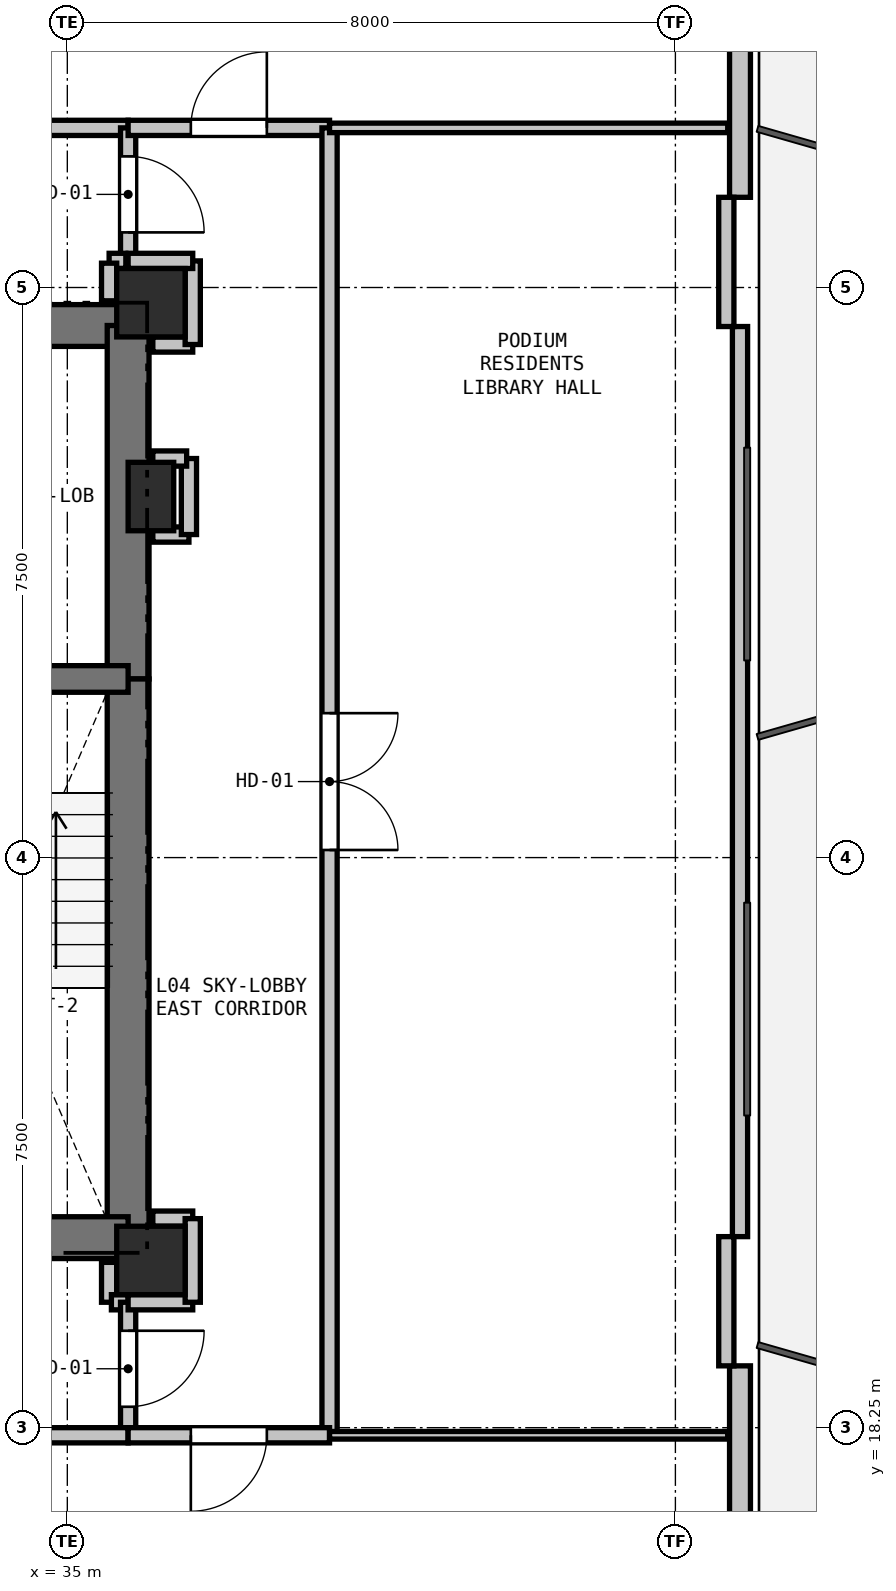
"""IFC4 building model, lengths in metres.
Left out: names, types, materials, properties, quantities, classifications, styles, units other than length and angle.
Written with IfcOpenShell. Run it as: python <this file> out.ifc"""

import sys

from ifc_helpers import new_model, si_unit, direction, frame, frame_2d, origin, origin_2d, place, context, subcontext, project, spatial, rectangle, extrude, element, fill, save


model = new_model("IFC4")
c1 = context("Model", 3, precision=1e-05, world=origin(), true_north=direction((0.0, 1.0)))
c2 = subcontext(c1, "Body", "Model", "MODEL_VIEW")
j1 = project(units=[si_unit("LENGTHUNIT", "METRE"), si_unit("PLANEANGLEUNIT", "RADIAN")], contexts=[c1])
p1 = place(None, origin())
s1 = spatial("IfcSite", under=j1, at=p1, CompositionType="ELEMENT")
p2 = place(p1, origin())
s2 = spatial("IfcBuilding", under=s1, at=p2, CompositionType="ELEMENT")
p3 = place(p2, frame((0.0, 0.0, 19.2)))
s3 = spatial("IfcBuildingStorey", under=s2, at=p3, CompositionType="ELEMENT", Elevation=19.2)
for number, where, z_axis, x_axis in (
    (1, (36.1, 33.05, 0.0), (0.0, 0.0, 1.0), (1.0, 0.0, 0.0)),
    (2, (36.1, 20.45, 0.0), (0.0, 0.0, 1.0), (1.0, 0.0, 0.0)),
):
    element("IfcColumn", number, at=place(p3, frame(where, z_axis=z_axis, x_axis=x_axis)), inside=s3, PredefinedType="COLUMN", context=c2, shape_type="SweptSolid", body=[
        extrude(rectangle(XDim=0.9, YDim=0.9, at=origin_2d()), origin(), (0.0, 0.0, 1.0), 3.3),
    ])
p4 = place(p3, frame((36.1, 30.5, 0.0), z_axis=(0.0, 0.0, 1.0), x_axis=(1.0, 0.0, 0.0)))
e3 = element("IfcColumn", 3, at=p4, inside=s3, PredefinedType="PILASTER", context=c2, shape_type="SweptSolid", body=[
    extrude(rectangle(XDim=0.6, YDim=0.9, at=origin_2d()), origin(), (0.0, 0.0, 1.0), 3.3),
])
p5 = place(p3, frame((43.85, 47.11, 0.0), z_axis=(0.0, 0.0, 1.0), x_axis=(0.0, -1.0, 0.0)))
e4 = element("IfcWall", 4, at=p5, inside=s3, PredefinedType="SOLIDWALL", context=c2, shape_type="SweptSolid", body=[
    extrude(rectangle(XDim=12.673, YDim=0.275, at=frame_2d((6.336, 0.0))), origin(), (0.0, 0.0, 1.0), 2.66),
])
p6 = place(p5, frame((8.136, 0.0, 0.0)))
e5 = element("IfcOpeningElement", 5, at=p6, cuts=e4, PredefinedType="OPENING", context=c2, shape_type="SweptSolid", body=[
    extrude(rectangle(XDim=1.0, YDim=2.1, at=frame_2d((0.5, 1.05))), frame((0.0, 0.147, 0.0), z_axis=(0.0, -1.0, 0.0), x_axis=(1.0, 0.0, 0.0)), (0.0, 0.0, 1.0), 0.295),
])
p7 = place(p3, frame((43.85, 32.737, 0.0), z_axis=(0.0, 0.0, 1.0), x_axis=(0.0, -1.0, 0.0)))
e6 = element("IfcWall", 6, at=p7, inside=s3, PredefinedType="PARAPET", context=c2, shape_type="SweptSolid", body=[
    extrude(rectangle(XDim=11.973, YDim=0.2, at=frame_2d((5.987, 0.0))), origin(), (0.0, 0.0, 1.0), 0.2),
])
p8 = place(p3, frame((43.85, 19.063, 0.0), z_axis=(0.0, 0.0, 1.0), x_axis=(0.0, -1.0, 0.0)))
e7 = element("IfcWall", 7, at=p8, inside=s3, PredefinedType="SOLIDWALL", context=c2, shape_type="SweptSolid", body=[
    extrude(rectangle(XDim=12.673, YDim=0.275, at=frame_2d((6.336, 0.0))), origin(), (0.0, 0.0, 1.0), 2.66),
])
p9 = place(p8, frame((2.876, 0.0, 0.9)))
e8 = element("IfcOpeningElement", 8, at=p9, cuts=e7, PredefinedType="OPENING", context=c2, shape_type="SweptSolid", body=[
    extrude(rectangle(XDim=2.4, YDim=1.6, at=frame_2d((1.2, 0.8))), frame((0.0, 0.147, 0.0), z_axis=(0.0, -1.0, 0.0), x_axis=(1.0, 0.0, 0.0)), (0.0, 0.0, 1.0), 0.295),
])
for number, where, z_axis, x_axis in (
    (9, (43.67, 34.437, 0.0), (0.0, 0.0, 1.0), (0.0, -1.0, 0.0)),
    (10, (43.67, 20.763, 0.0), (0.0, 0.0, 1.0), (0.0, -1.0, 0.0)),
):
    element("IfcWall", number, at=place(p3, frame(where, z_axis=z_axis, x_axis=x_axis)), inside=s3, PredefinedType="PARAPET", context=c2, shape_type="SweptSolid", body=[
        extrude(rectangle(XDim=1.7, YDim=0.2, at=frame_2d((0.85, 0.0))), origin(), (0.0, 0.0, 1.0), 2.66),
    ])
p10 = place(p3, frame((32.35, 32.75, 0.0), z_axis=(0.0, 0.0, 1.0), x_axis=(1.0, 0.0, 0.0)))
e11 = element("IfcWall", 11, at=p10, inside=s3, PredefinedType="SHEAR", context=c2, shape_type="SweptSolid", body=[
    extrude(rectangle(XDim=3.45, YDim=0.55, at=frame_2d((1.725, 0.0))), origin(), (0.0, 0.0, 1.0), 3.04),
])
p11 = place(p10, frame((0.65, 0.0, 0.0)))
e12 = element("IfcOpeningElement", 12, at=p11, cuts=e11, PredefinedType="OPENING", context=c2, shape_type="SweptSolid", body=[
    extrude(rectangle(XDim=1.15, YDim=2.15, at=frame_2d((0.575, 1.075))), frame((0.0, 0.285, 0.0), z_axis=(0.0, -1.0, 0.0), x_axis=(1.0, 0.0, 0.0)), (0.0, 0.0, 1.0), 0.57),
])
p12 = place(p3, frame((35.8, 32.75, 0.0), z_axis=(0.0, 0.0, 1.0), x_axis=(0.0, -1.0, 0.0)))
e13 = element("IfcWall", 13, at=p12, inside=s3, PredefinedType="SHEAR", context=c2, shape_type="SweptSolid", body=[
    extrude(rectangle(XDim=4.65, YDim=0.55, at=frame_2d((2.325, 0.0))), origin(), (0.0, 0.0, 1.0), 3.04),
])
p13 = place(p3, frame((35.8, 28.1, 0.0), z_axis=(0.0, 0.0, 1.0), x_axis=(0.0, -1.0, 0.0)))
e14 = element("IfcWall", 14, at=p13, inside=s3, PredefinedType="SHEAR", context=c2, shape_type="SweptSolid", body=[
    extrude(rectangle(XDim=7.35, YDim=0.55, at=frame_2d((3.675, 0.0))), origin(), (0.0, 0.0, 1.0), 3.04),
])
p14 = place(p3, frame((35.8, 20.75, 0.0), z_axis=(0.0, 0.0, 1.0), x_axis=(-1.0, 0.0, 0.0)))
e15 = element("IfcWall", 15, at=p14, inside=s3, PredefinedType="SHEAR", context=c2, shape_type="SweptSolid", body=[
    extrude(rectangle(XDim=3.45, YDim=0.55, at=frame_2d((1.725, 0.0))), origin(), (0.0, 0.0, 1.0), 3.04),
])
p15 = place(p3, frame((32.35, 28.1, 0.0), z_axis=(0.0, 0.0, 1.0), x_axis=(1.0, 0.0, 0.0)))
e16 = element("IfcWall", 16, at=p15, inside=s3, PredefinedType="SHEAR", context=c2, shape_type="SweptSolid", body=[
    extrude(rectangle(XDim=3.45, YDim=0.35, at=frame_2d((1.725, 0.0))), origin(), (0.0, 0.0, 1.0), 3.04),
])
p16 = place(p15, frame((1.15, 0.0, 0.0)))
e17 = element("IfcOpeningElement", 17, at=p16, cuts=e16, PredefinedType="OPENING", context=c2, shape_type="SweptSolid", body=[
    extrude(rectangle(XDim=1.15, YDim=2.15, at=frame_2d((0.575, 1.075))), frame((0.0, 0.185, 0.0), z_axis=(0.0, -1.0, 0.0), x_axis=(1.0, 0.0, 0.0)), (0.0, 0.0, 1.0), 0.37),
])
p17 = place(p3, frame((35.55, 20.425, 0.0), z_axis=(0.0, 0.0, 1.0), x_axis=(0.0, -1.0, 0.0)))
e18 = element("IfcWall", 18, at=p17, inside=s3, PredefinedType="PARTITIONING", context=c2, shape_type="SweptSolid", body=[
    extrude(rectangle(XDim=0.525, YDim=0.2, at=frame_2d((0.263, 0.0))), origin(), (0.0, 0.0, 1.0), 2.488),
])
p18 = place(p3, frame((35.58, 19.9, 0.0), z_axis=(0.0, 0.0, 1.0), x_axis=(1.0, 0.0, 0.0)))
e19 = element("IfcWall", 19, at=p18, inside=s3, PredefinedType="PARTITIONING", context=c2, shape_type="SweptSolid", body=[
    extrude(rectangle(XDim=0.22, YDim=0.2, at=frame_2d((0.11, 0.0))), origin(), (0.0, 0.0, 1.0), 3.04),
])
p19 = place(p3, frame((35.8, 19.9, 0.0), z_axis=(0.0, 0.0, 1.0), x_axis=(0.0, -1.0, 0.0)))
e20 = element("IfcWall", 20, at=p19, inside=s3, PredefinedType="PARTITIONING", context=c2, shape_type="SweptSolid", body=[
    extrude(rectangle(XDim=1.75, YDim=0.2, at=frame_2d((0.875, 0.0))), origin(), (0.0, 0.0, 1.0), 3.04),
])
p20 = place(p19, frame((0.375, 0.0, 0.0)))
e21 = element("IfcOpeningElement", 21, at=p20, cuts=e20, PredefinedType="OPENING", context=c2, shape_type="SweptSolid", body=[
    extrude(rectangle(XDim=1.0, YDim=2.15, at=frame_2d((0.5, 1.075))), frame((0.0, 0.11, 0.0), z_axis=(0.0, -1.0, 0.0), x_axis=(1.0, 0.0, 0.0)), (0.0, 0.0, 1.0), 0.22),
])
p21 = place(p3, frame((35.8, 18.15, 0.0), z_axis=(0.0, 0.0, 1.0), x_axis=(-1.0, 0.0, 0.0)))
e22 = element("IfcWall", 22, at=p21, inside=s3, PredefinedType="PARTITIONING", context=c2, shape_type="SweptSolid", body=[
    extrude(rectangle(XDim=8.3, YDim=0.2, at=frame_2d((4.15, 0.0))), origin(), (0.0, 0.0, 1.0), 3.04),
])
p22 = place(p21, frame((3.25, 0.0, 0.0)))
e23 = element("IfcOpeningElement", 23, at=p22, cuts=e22, PredefinedType="OPENING", context=c2, shape_type="SweptSolid", body=[
    extrude(rectangle(XDim=1.8, YDim=2.2, at=frame_2d((0.9, 1.1))), frame((0.0, 0.11, 0.0), z_axis=(0.0, -1.0, 0.0), x_axis=(1.0, 0.0, 0.0)), (0.0, 0.0, 1.0), 0.22),
])
p23 = place(p3, frame((28.0, 35.35, 0.0), z_axis=(0.0, 0.0, 1.0), x_axis=(1.0, 0.0, 0.0)))
e24 = element("IfcWall", 24, at=p23, inside=s3, PredefinedType="PARTITIONING", context=c2, shape_type="SweptSolid", body=[
    extrude(rectangle(XDim=7.8, YDim=0.2, at=frame_2d((3.9, 0.0))), origin(), (0.0, 0.0, 1.0), 3.04),
])
p24 = place(p23, frame((3.4, 0.0, 0.0)))
e25 = element("IfcOpeningElement", 25, at=p24, cuts=e24, PredefinedType="OPENING", context=c2, shape_type="SweptSolid", body=[
    extrude(rectangle(XDim=1.0, YDim=2.15, at=frame_2d((0.5, 1.075))), frame((0.0, 0.11, 0.0), z_axis=(0.0, -1.0, 0.0), x_axis=(1.0, 0.0, 0.0)), (0.0, 0.0, 1.0), 0.22),
])
p25 = place(p3, frame((35.8, 35.35, 0.0), z_axis=(0.0, 0.0, 1.0), x_axis=(0.0, -1.0, 0.0)))
e26 = element("IfcWall", 26, at=p25, inside=s3, PredefinedType="PARTITIONING", context=c2, shape_type="SweptSolid", body=[
    extrude(rectangle(XDim=1.75, YDim=0.2, at=frame_2d((0.875, 0.0))), origin(), (0.0, 0.0, 1.0), 3.04),
])
p26 = place(p25, frame((0.375, 0.0, 0.0)))
e27 = element("IfcOpeningElement", 27, at=p26, cuts=e26, PredefinedType="OPENING", context=c2, shape_type="SweptSolid", body=[
    extrude(rectangle(XDim=1.0, YDim=2.15, at=frame_2d((0.5, 1.075))), frame((0.0, 0.11, 0.0), z_axis=(0.0, -1.0, 0.0), x_axis=(1.0, 0.0, 0.0)), (0.0, 0.0, 1.0), 0.22),
])
p27 = place(p3, frame((35.77, 33.6, 0.0), z_axis=(0.0, 0.0, 1.0), x_axis=(-1.0, 0.0, 0.0)))
e28 = element("IfcWall", 28, at=p27, inside=s3, PredefinedType="PARTITIONING", context=c2, shape_type="SweptSolid", body=[
    extrude(rectangle(XDim=0.22, YDim=0.2, at=frame_2d((0.11, 0.0))), origin(), (0.0, 0.0, 1.0), 3.04),
])
p28 = place(p3, frame((35.55, 33.57, 0.0), z_axis=(0.0, 0.0, 1.0), x_axis=(0.0, -1.0, 0.0)))
e29 = element("IfcWall", 29, at=p28, inside=s3, PredefinedType="PARTITIONING", context=c2, shape_type="SweptSolid", body=[
    extrude(rectangle(XDim=0.495, YDim=0.2, at=frame_2d((0.248, 0.0))), origin(), (0.0, 0.0, 1.0), 2.488),
])
p29 = place(p3, frame((36.65, 21.0, 0.0), z_axis=(0.0, 0.0, 1.0), x_axis=(-1.0, 0.0, 0.0)))
e30 = element("IfcWall", 30, at=p29, inside=s3, PredefinedType="PARTITIONING", context=c2, shape_type="SweptSolid", body=[
    extrude(rectangle(XDim=0.525, YDim=0.2, at=frame_2d((0.262, 0.0))), origin(), (0.0, 0.0, 1.0), 2.488),
])
p30 = place(p3, frame((36.125, 30.0, 0.0), z_axis=(0.0, 0.0, 1.0), x_axis=(1.0, 0.0, 0.0)))
e31 = element("IfcWall", 31, at=p30, inside=s3, PredefinedType="PARTITIONING", context=c2, shape_type="SweptSolid", body=[
    extrude(rectangle(XDim=0.475, YDim=0.2, at=frame_2d((0.238, 0.0))), origin(), (0.0, 0.0, 1.0), 2.488),
])
p31 = place(p3, frame((36.6, 30.0, 0.0), z_axis=(0.0, 0.0, 1.0), x_axis=(0.0, 1.0, 0.0)))
e32 = element("IfcWall", 32, at=p31, inside=s3, PredefinedType="PARTITIONING", context=c2, shape_type="SweptSolid", body=[
    extrude(rectangle(XDim=1.0, YDim=0.2, at=frame_2d((0.5, 0.0))), origin(), (0.0, 0.0, 1.0), 3.04),
])
p32 = place(p3, frame((36.57, 31.0, 0.0), z_axis=(0.0, 0.0, 1.0), x_axis=(-1.0, 0.0, 0.0)))
e33 = element("IfcWall", 33, at=p32, inside=s3, PredefinedType="PARTITIONING", context=c2, shape_type="SweptSolid", body=[
    extrude(rectangle(XDim=0.445, YDim=0.2, at=frame_2d((0.223, 0.0))), origin(), (0.0, 0.0, 1.0), 2.488),
])
p33 = place(p3, frame((36.125, 32.5, 0.0), z_axis=(0.0, 0.0, 1.0), x_axis=(1.0, 0.0, 0.0)))
e34 = element("IfcWall", 34, at=p33, inside=s3, PredefinedType="PARTITIONING", context=c2, shape_type="SweptSolid", body=[
    extrude(rectangle(XDim=0.525, YDim=0.2, at=frame_2d((0.262, 0.0))), origin(), (0.0, 0.0, 1.0), 2.488),
])
p34 = place(p3, frame((36.65, 32.5, 0.0), z_axis=(0.0, 0.0, 1.0), x_axis=(0.0, 1.0, 0.0)))
e35 = element("IfcWall", 35, at=p34, inside=s3, PredefinedType="PARTITIONING", context=c2, shape_type="SweptSolid", body=[
    extrude(rectangle(XDim=1.1, YDim=0.2, at=frame_2d((0.55, 0.0))), origin(), (0.0, 0.0, 1.0), 2.338),
])
p35 = place(p3, frame((36.65, 33.6, 0.0), z_axis=(0.0, 0.0, 1.0), x_axis=(-1.0, 0.0, 0.0)))
e36 = element("IfcWall", 36, at=p35, inside=s3, PredefinedType="PARTITIONING", context=c2, shape_type="SweptSolid", body=[
    extrude(rectangle(XDim=0.85, YDim=0.2, at=frame_2d((0.425, 0.0))), origin(), (0.0, 0.0, 1.0), 2.338),
])
p36 = place(p3, frame((35.8, 35.35, 0.0), z_axis=(0.0, 0.0, 1.0), x_axis=(1.0, 0.0, 0.0)))
e37 = element("IfcWall", 37, at=p36, inside=s3, PredefinedType="PARTITIONING", context=c2, shape_type="SweptSolid", body=[
    extrude(rectangle(XDim=2.65, YDim=0.2, at=frame_2d((1.325, 0.0))), origin(), (0.0, 0.0, 1.0), 2.338),
])
p37 = place(p36, frame((0.825, 0.0, 0.0)))
e38 = element("IfcOpeningElement", 38, at=p37, cuts=e37, PredefinedType="OPENING", context=c2, shape_type="SweptSolid", body=[
    extrude(rectangle(XDim=1.0, YDim=2.15, at=frame_2d((0.5, 1.075))), frame((0.0, 0.11, 0.0), z_axis=(0.0, -1.0, 0.0), x_axis=(1.0, 0.0, 0.0)), (0.0, 0.0, 1.0), 0.22),
])
p38 = place(p3, frame((38.45, 35.35, 0.0), z_axis=(0.0, 0.0, 1.0), x_axis=(0.0, -1.0, 0.0)))
e39 = element("IfcWall", 39, at=p38, inside=s3, PredefinedType="PARTITIONING", context=c2, shape_type="SweptSolid", body=[
    extrude(rectangle(XDim=17.2, YDim=0.2, at=frame_2d((8.6, 0.0))), origin(), (0.0, 0.0, 1.0), 3.04),
])
p39 = place(p38, frame((7.7, 0.0, 0.0)))
e40 = element("IfcOpeningElement", 40, at=p39, cuts=e39, PredefinedType="OPENING", context=c2, shape_type="SweptSolid", body=[
    extrude(rectangle(XDim=1.8, YDim=2.2, at=frame_2d((0.9, 1.1))), frame((0.0, 0.11, 0.0), z_axis=(0.0, -1.0, 0.0), x_axis=(1.0, 0.0, 0.0)), (0.0, 0.0, 1.0), 0.22),
])
p40 = place(p3, frame((38.45, 18.15, 0.0), z_axis=(0.0, 0.0, 1.0), x_axis=(-1.0, 0.0, 0.0)))
e41 = element("IfcWall", 41, at=p40, inside=s3, PredefinedType="PARTITIONING", context=c2, shape_type="SweptSolid", body=[
    extrude(rectangle(XDim=2.65, YDim=0.2, at=frame_2d((1.325, 0.0))), origin(), (0.0, 0.0, 1.0), 2.338),
])
p41 = place(p40, frame((0.825, 0.0, 0.0)))
e42 = element("IfcOpeningElement", 42, at=p41, cuts=e41, PredefinedType="OPENING", context=c2, shape_type="SweptSolid", body=[
    extrude(rectangle(XDim=1.0, YDim=2.15, at=frame_2d((0.5, 1.075))), frame((0.0, 0.11, 0.0), z_axis=(0.0, -1.0, 0.0), x_axis=(1.0, 0.0, 0.0)), (0.0, 0.0, 1.0), 0.22),
])
p42 = place(p3, frame((35.8, 19.9, 0.0), z_axis=(0.0, 0.0, 1.0), x_axis=(1.0, 0.0, 0.0)))
e43 = element("IfcWall", 43, at=p42, inside=s3, PredefinedType="PARTITIONING", context=c2, shape_type="SweptSolid", body=[
    extrude(rectangle(XDim=0.85, YDim=0.2, at=frame_2d((0.425, 0.0))), origin(), (0.0, 0.0, 1.0), 2.338),
])
p43 = place(p3, frame((36.65, 19.9, 0.0), z_axis=(0.0, 0.0, 1.0), x_axis=(0.0, 1.0, 0.0)))
e44 = element("IfcWall", 44, at=p43, inside=s3, PredefinedType="PARTITIONING", context=c2, shape_type="SweptSolid", body=[
    extrude(rectangle(XDim=1.1, YDim=0.2, at=frame_2d((0.55, 0.0))), origin(), (0.0, 0.0, 1.0), 3.04),
])
p44 = place(p3, frame((43.688, 35.35, 0.0), z_axis=(0.0, 0.0, 1.0), x_axis=(-1.0, 0.0, 0.0)))
e45 = element("IfcWall", 45, at=p44, inside=s3, PredefinedType="PARTITIONING", context=c2, shape_type="SweptSolid", body=[
    extrude(rectangle(XDim=5.239, YDim=0.125, at=frame_2d((2.619, 0.0))), origin(), (0.0, 0.0, 1.0), 2.365),
])
p45 = place(p3, frame((43.688, 18.15, 0.0), z_axis=(0.0, 0.0, 1.0), x_axis=(-1.0, 0.0, 0.0)))
e46 = element("IfcWall", 46, at=p45, inside=s3, PredefinedType="PARTITIONING", context=c2, shape_type="SweptSolid", body=[
    extrude(rectangle(XDim=5.239, YDim=0.1, at=frame_2d((2.619, 0.0))), origin(), (0.0, 0.0, 1.0), 2.365),
])
p46 = place(p20, origin())
e47 = element("IfcDoor", 47, at=p46, inside=s3, OperationType="SINGLE_SWING_LEFT", PredefinedType="DOOR", context=c2, shape_type="SweptSolid", body=[
    extrude(rectangle(XDim=1.0, YDim=2.15, at=frame_2d((0.5, 1.075))), frame((0.0, 0.025, 0.0), z_axis=(0.0, -1.0, 0.0), x_axis=(1.0, 0.0, 0.0)), (0.0, 0.0, 1.0), 0.05),
])
fill(e21, e47)
p47 = place(p26, origin())
e48 = element("IfcDoor", 48, at=p47, inside=s3, OperationType="SINGLE_SWING_RIGHT", PredefinedType="DOOR", context=c2, shape_type="SweptSolid", body=[
    extrude(rectangle(XDim=1.0, YDim=2.15, at=frame_2d((0.5, 1.075))), frame((0.0, 0.025, 0.0), z_axis=(0.0, -1.0, 0.0), x_axis=(1.0, 0.0, 0.0)), (0.0, 0.0, 1.0), 0.05),
])
fill(e27, e48)
p48 = place(p37, origin())
e49 = element("IfcDoor", 49, at=p48, inside=s3, OperationType="SINGLE_SWING_RIGHT", PredefinedType="DOOR", context=c2, shape_type="SweptSolid", body=[
    extrude(rectangle(XDim=1.0, YDim=2.15, at=frame_2d((0.5, 1.075))), frame((0.0, 0.025, 0.0), z_axis=(0.0, -1.0, 0.0), x_axis=(1.0, 0.0, 0.0)), (0.0, 0.0, 1.0), 0.05),
])
fill(e38, e49)
p49 = place(p39, origin())
e50 = element("IfcDoor", 50, at=p49, inside=s3, OperationType="DOUBLE_DOOR_SINGLE_SWING", PredefinedType="DOOR", context=c2, shape_type="SweptSolid", body=[
    extrude(rectangle(XDim=1.8, YDim=2.2, at=frame_2d((0.9, 1.1))), frame((0.0, 0.025, 0.0), z_axis=(0.0, -1.0, 0.0), x_axis=(1.0, 0.0, 0.0)), (0.0, 0.0, 1.0), 0.05),
])
fill(e40, e50)
p50 = place(p41, origin())
e51 = element("IfcDoor", 51, at=p50, inside=s3, OperationType="SINGLE_SWING_RIGHT", PredefinedType="DOOR", context=c2, shape_type="SweptSolid", body=[
    extrude(rectangle(XDim=1.0, YDim=2.15, at=frame_2d((0.5, 1.075))), frame((0.0, 0.025, 0.0), z_axis=(0.0, -1.0, 0.0), x_axis=(1.0, 0.0, 0.0)), (0.0, 0.0, 1.0), 0.05),
])
fill(e42, e51)
save(model, sys.argv[1])
